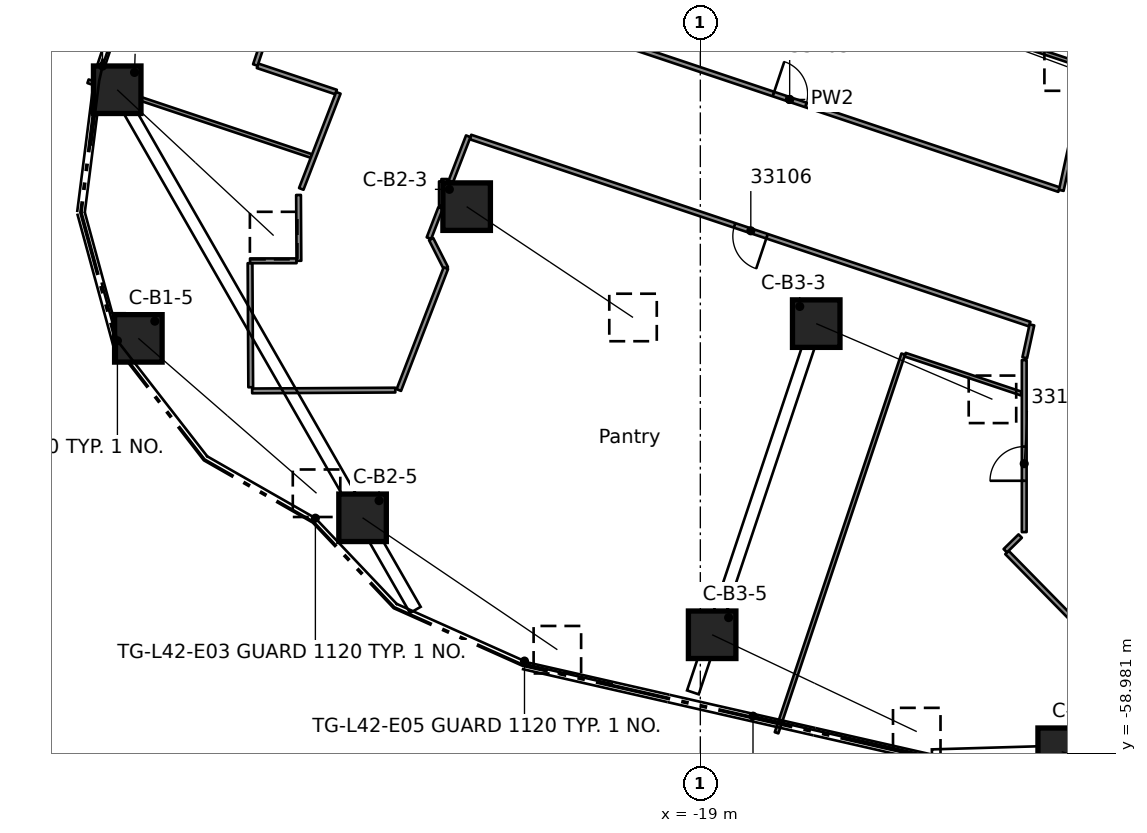
"""IFC4 building model, lengths in metres.
Left out: names, types, materials, properties, quantities, classifications, styles, units other than length and angle.
Written with IfcOpenShell. Run it as: python <this file> out.ifc"""

import sys

from ifc_helpers import new_model, si_unit, direction, frame, frame_2d, origin, origin_2d, place, context, subcontext, project, spatial, rectangle, extrude, element, fill, save


model = new_model("IFC4")
c1 = context("Model", 3, precision=1e-05, world=origin(), true_north=direction((0.0, 1.0)))
c2 = subcontext(c1, "Body", "Model", "MODEL_VIEW")
j1 = project(units=[si_unit("LENGTHUNIT", "METRE"), si_unit("PLANEANGLEUNIT", "RADIAN")], contexts=[c1])
p1 = place(None, origin())
s1 = spatial("IfcSite", under=j1, at=p1, CompositionType="ELEMENT")
p2 = place(p1, origin())
s2 = spatial("IfcBuilding", under=s1, at=p2, CompositionType="ELEMENT")
p3 = place(p2, frame((0.0, 0.0, 163.1)))
s3 = spatial("IfcBuildingStorey", under=s2, at=p3, CompositionType="ELEMENT", Elevation=163.1)
p4 = place(p3, frame((-34.344, -41.515, 0.556), z_axis=(0.650749520323, -0.606668854079, 0.456593871279), x_axis=(0.681899220361, 0.731446138326, 0.0)))
e1 = element("IfcColumn", 1, at=p4, inside=s3, PredefinedType="COLUMN", context=c2, shape_type="SweptSolid", body=[
    extrude(rectangle(XDim=1.25, YDim=1.25, at=origin_2d()), origin(), (0.0, 0.0, 1.0), 6.325),
])
p5 = place(p3, frame((-33.788, -48.056, 0.567), z_axis=(0.685344408242, -0.595777894409, 0.418750215075), x_axis=(0.656069747927, 0.75470026226, 0.0)))
e2 = element("IfcColumn", 2, at=p5, inside=s3, PredefinedType="COLUMN", context=c2, shape_type="SweptSolid", body=[
    extrude(rectangle(XDim=1.25, YDim=1.25, at=origin_2d()), origin(), (0.0, 0.0, 1.0), 6.842),
])
p6 = place(p3, frame((-25.149, -44.591, 0.547), z_axis=(0.728513829008, -0.485242537011, 0.483536225343), x_axis=(0.554357406679, 0.832278718735, 0.0)))
e3 = element("IfcColumn", 3, at=p6, inside=s3, PredefinedType="COLUMN", context=c2, shape_type="SweptSolid", body=[
    extrude(rectangle(XDim=1.25, YDim=1.25, at=origin_2d()), origin(), (0.0, 0.0, 1.0), 6.009),
])
p7 = place(p3, frame((-27.888, -52.778, 0.567), z_axis=(0.751434378717, -0.508817992104, 0.420060264003), x_axis=(0.56068332345, 0.82803031998, 0.0)))
e4 = element("IfcColumn", 4, at=p7, inside=s3, PredefinedType="COLUMN", context=c2, shape_type="SweptSolid", body=[
    extrude(rectangle(XDim=1.25, YDim=1.25, at=origin_2d()), origin(), (0.0, 0.0, 1.0), 6.822),
])
p8 = place(p3, frame((-13.21, -39.482, 0.507), z_axis=(0.761221861234, -0.281091530402, 0.58440467958), x_axis=(0.346401191704, 0.938086464238, 0.0)))
e5 = element("IfcColumn", 5, at=p8, inside=s3, PredefinedType="COLUMN", context=c2, shape_type="SweptSolid", body=[
    extrude(rectangle(XDim=1.25, YDim=1.25, at=origin_2d()), origin(), (0.0, 0.0, 1.0), 5.109),
])
p9 = place(p3, frame((-15.95, -47.669, 0.541), z_axis=(0.795438712941, -0.34170402037, 0.500515350832), x_axis=(0.394701516002, 0.918809399857, 0.0)))
e6 = element("IfcColumn", 6, at=p9, inside=s3, PredefinedType="COLUMN", context=c2, shape_type="SweptSolid", body=[
    extrude(rectangle(XDim=1.25, YDim=1.25, at=origin_2d()), origin(), (0.0, 0.0, 1.0), 5.829),
])
p10 = place(p3, frame((-18.689, -55.856, 0.563), z_axis=(0.814063560894, -0.385271001, 0.434588051622), x_axis=(0.427779753308, 0.90388300275, 0.0)))
e7 = element("IfcColumn", 7, at=p10, inside=s3, PredefinedType="COLUMN", context=c2, shape_type="SweptSolid", body=[
    extrude(rectangle(XDim=1.25, YDim=1.25, at=origin_2d()), origin(), (0.0, 0.0, 1.0), 6.614),
])
p11 = place(p3, frame((-9.491, -58.934, 0.561), z_axis=(0.862996024395, -0.248319472025, 0.439971932845), x_axis=(0.276521475753, 0.961007738495, 0.0)))
e8 = element("IfcColumn", 8, at=p11, inside=s3, PredefinedType="COLUMN", context=c2, shape_type="SweptSolid", body=[
    extrude(rectangle(XDim=1.25, YDim=1.25, at=origin_2d()), origin(), (0.0, 0.0, 1.0), 6.54),
])
p12 = place(p3, frame((-30.849, -46.079, 0.0), z_axis=(0.0, 0.0, 1.0), x_axis=(0.005535108565, -0.999984681169, 0.0)))
e9 = element("IfcWall", 9, at=p12, inside=s3, PredefinedType="PARTITIONING", context=c2, shape_type="SweptSolid", body=[
    extrude(rectangle(XDim=3.264, YDim=0.125, at=frame_2d((1.632, 0.0))), origin(), (0.0, 0.0, 1.0), 3.56),
])
p13 = place(p3, frame((-10.932, -53.69, 0.0), z_axis=(0.0, 0.0, 1.0), x_axis=(0.700343889426, -0.713805601368, 0.0)))
e10 = element("IfcWall", 10, at=p13, inside=s3, PredefinedType="PARTITIONING", context=c2, shape_type="SweptSolid", body=[
    extrude(rectangle(XDim=7.291, YDim=0.125, at=frame_2d((3.645, 0.0))), origin(), (0.0, 0.0, 1.0), 3.56),
])
p14 = place(p3, frame((-26.084, -45.444, 0.0), z_axis=(0.0, 0.0, 1.0), x_axis=(0.452330198843, -0.891850543093, 0.0)))
e11 = element("IfcWall", 11, at=p14, inside=s3, PredefinedType="PARTITIONING", context=c2, shape_type="SweptSolid", body=[
    extrude(rectangle(XDim=0.858, YDim=0.125, at=frame_2d((0.429, 0.0))), origin(), (0.0, 0.0, 1.0), 3.56),
])
p15 = place(p3, frame((-35.112, -41.292, 0.0), z_axis=(0.0, 0.0, 1.0), x_axis=(0.948312413327, -0.317338252863, 0.0)))
e12 = element("IfcWall", 12, at=p15, inside=s3, PredefinedType="PARTITIONING", context=c2, shape_type="SweptSolid", body=[
    extrude(rectangle(XDim=6.198, YDim=0.1, at=frame_2d((3.099, 0.0))), origin(), (0.0, 0.0, 1.0), 3.56),
])
p16 = place(p3, frame((-13.612, -48.486, 0.0), z_axis=(0.0, 0.0, 1.0), x_axis=(0.948319156471, -0.317318101391, 0.0)))
e13 = element("IfcWall", 13, at=p16, inside=s3, PredefinedType="PARTITIONING", context=c2, shape_type="SweptSolid", body=[
    extrude(rectangle(XDim=3.224, YDim=0.1, at=frame_2d((1.612, 0.0))), origin(), (0.0, 0.0, 1.0), 3.56),
])
p17 = place(p3, frame((-30.651, -40.885, 0.0), z_axis=(0.0, 0.0, 1.0), x_axis=(0.948414092201, -0.317034240601, 0.0)))
e14 = element("IfcWall", 14, at=p17, inside=s3, PredefinedType="PARTITIONING", context=c2, shape_type="SweptSolid", body=[
    extrude(rectangle(XDim=2.179, YDim=0.125, at=frame_2d((1.09, 0.0))), origin(), (0.0, 0.0, 1.0), 3.56),
])
p18 = place(p3, frame((-10.334, -47.682, 0.0), z_axis=(0.0, 0.0, 1.0), x_axis=(-0.948331823852, 0.317280241852, 0.0)))
e15 = element("IfcWall", 15, at=p18, inside=s3, PredefinedType="PARTITIONING", context=c2, shape_type="SweptSolid", body=[
    extrude(rectangle(XDim=15.516, YDim=0.125, at=frame_2d((7.758, 0.0))), origin(), (0.0, 0.0, 1.0), 3.56),
])
p19 = place(p18, frame((7.288, 0.0, 0.0)))
e16 = element("IfcOpeningElement", 16, at=p19, cuts=e15, PredefinedType="OPENING", context=c2, shape_type="SweptSolid", body=[
    extrude(rectangle(XDim=0.9, YDim=2.1, at=frame_2d((0.45, 1.05))), frame((0.0, 0.073, 0.0), z_axis=(0.0, -1.0, 0.0), x_axis=(1.0, 0.0, 0.0)), (0.0, 0.0, 1.0), 0.145),
])
p20 = place(p3, frame((-23.75, -39.396, 0.0), z_axis=(0.0, 0.0, 1.0), x_axis=(0.948333527716, -0.317275149057, 0.0)))
e17 = element("IfcWall", 17, at=p20, inside=s3, PredefinedType="PARTITIONING", context=c2, shape_type="SweptSolid", body=[
    extrude(rectangle(XDim=14.962, YDim=0.125, at=frame_2d((7.481, 0.0))), origin(), (0.0, 0.0, 1.0), 3.56),
])
p21 = place(p20, frame((7.038, 0.0, 0.0)))
e18 = element("IfcOpeningElement", 18, at=p21, cuts=e17, PredefinedType="OPENING", context=c2, shape_type="SweptSolid", body=[
    extrude(rectangle(XDim=0.9, YDim=2.1, at=frame_2d((0.45, 1.05))), frame((0.0, 0.073, 0.0), z_axis=(0.0, -1.0, 0.0), x_axis=(1.0, 0.0, 0.0)), (0.0, 0.0, 1.0), 0.145),
])
p22 = place(p3, frame((-22.995, -36.173, 0.0), z_axis=(0.0, 0.0, 1.0), x_axis=(0.948340615741, -0.317253962207, 0.0)))
e19 = element("IfcWall", 19, at=p22, inside=s3, PredefinedType="PARTITIONING", context=c2, shape_type="SweptSolid", body=[
    extrude(rectangle(XDim=15.057, YDim=0.1, at=frame_2d((7.528, 0.0))), origin(), (0.0, 0.0, 1.0), 3.56),
])
p23 = place(p3, frame((-30.849, -46.016, 0.0), z_axis=(0.0, 0.0, 1.0), x_axis=(1.0, 0.0, 0.0)))
e20 = element("IfcWall", 20, at=p23, inside=s3, PredefinedType="PARTITIONING", context=c2, shape_type="SweptSolid", body=[
    extrude(rectangle(XDim=1.224, YDim=0.125, at=frame_2d((0.612, 0.0))), origin(), (0.0, 0.0, 1.0), 3.56),
])
p24 = place(p3, frame((-25.813, -43.927, 0.0), z_axis=(0.0, 0.0, 1.0), x_axis=(1.0, 0.0, 0.0)))
e21 = element("IfcWall", 21, at=p24, inside=s3, PredefinedType="PARTITIONING", context=c2, shape_type="SweptSolid", body=[
    extrude(rectangle(XDim=0.157, YDim=0.125, at=frame_2d((0.079, 0.0))), origin(), (0.0, 0.0, 1.0), 3.56),
])
p25 = place(p3, frame((-30.793, -49.439, 0.0), z_axis=(0.0, 0.0, 1.0), x_axis=(0.999984458017, 0.005575278016, 0.0)))
e22 = element("IfcWall", 22, at=p25, inside=s3, PredefinedType="PARTITIONING", context=c2, shape_type="SweptSolid", body=[
    extrude(rectangle(XDim=3.766, YDim=0.125, at=frame_2d((1.883, 0.0))), origin(), (0.0, 0.0, 1.0), 3.56),
])
p26 = place(p3, frame((-10.976, -53.645, 0.0), z_axis=(0.0, 0.0, 1.0), x_axis=(0.713503545627, 0.700651618408, 0.0)))
e23 = element("IfcWall", 23, at=p26, inside=s3, PredefinedType="PARTITIONING", context=c2, shape_type="SweptSolid", body=[
    extrude(rectangle(XDim=0.551, YDim=0.125, at=frame_2d((0.275, 0.0))), origin(), (0.0, 0.0, 1.0), 3.56),
])
p27 = place(p3, frame((-26.934, -49.417, 0.0), z_axis=(0.0, 0.0, 1.0), x_axis=(0.360039818121, 0.932936937508, 0.0)))
e24 = element("IfcWall", 24, at=p27, inside=s3, PredefinedType="PARTITIONING", context=c2, shape_type="SweptSolid", body=[
    extrude(rectangle(XDim=3.439, YDim=0.125, at=frame_2d((1.719, 0.0))), origin(), (0.0, 0.0, 1.0), 3.56),
])
p28 = place(p3, frame((-26.142, -45.421, 0.0), z_axis=(0.0, 0.0, 1.0), x_axis=(0.360172075404, 0.932885885894, 0.0)))
e25 = element("IfcWall", 25, at=p28, inside=s3, PredefinedType="PARTITIONING", context=c2, shape_type="SweptSolid", body=[
    extrude(rectangle(XDim=0.85, YDim=0.125, at=frame_2d((0.425, 0.0))), origin(), (0.0, 0.0, 1.0), 3.56),
])
p29 = place(p3, frame((-25.565, -43.926, 0.0), z_axis=(0.0, 0.0, 1.0), x_axis=(0.359981832882, 0.932959313151, 0.0)))
e26 = element("IfcWall", 26, at=p29, inside=s3, PredefinedType="PARTITIONING", context=c2, shape_type="SweptSolid", body=[
    extrude(rectangle(XDim=1.272, YDim=0.125, at=frame_2d((0.636, 0.0))), origin(), (0.0, 0.0, 1.0), 3.56),
])
p30 = place(p3, frame((-28.525, -41.596, 0.0), z_axis=(0.0, 0.0, 1.0), x_axis=(-0.360180137792, -0.932882773096, 0.0)))
e27 = element("IfcWall", 27, at=p30, inside=s3, PredefinedType="PARTITIONING", context=c2, shape_type="SweptSolid", body=[
    extrude(rectangle(XDim=2.71, YDim=0.125, at=frame_2d((1.355, 0.0))), origin(), (0.0, 0.0, 1.0), 3.56),
])
p31 = place(p3, frame((-16.994, -58.435, 0.0), z_axis=(0.0, 0.0, 1.0), x_axis=(0.317308025423, 0.948322527942, 0.0)))
e28 = element("IfcWall", 28, at=p31, inside=s3, PredefinedType="PARTITIONING", context=c2, shape_type="SweptSolid", body=[
    extrude(rectangle(XDim=10.507, YDim=0.1, at=frame_2d((5.253, 0.0))), origin(), (0.0, 0.0, 1.0), 3.56),
])
p32 = place(p3, frame((-30.71, -40.864, 0.0), z_axis=(0.0, 0.0, 1.0), x_axis=(0.317183836314, 0.948364072485, 0.0)))
e29 = element("IfcWall", 29, at=p32, inside=s3, PredefinedType="PARTITIONING", context=c2, shape_type="SweptSolid", body=[
    extrude(rectangle(XDim=3.6, YDim=0.125, at=frame_2d((1.8, 0.0))), origin(), (0.0, 0.0, 1.0), 3.56),
])
p33 = place(p32, frame((1.35, 0.0, 0.0)))
e30 = element("IfcOpeningElement", 30, at=p33, cuts=e29, PredefinedType="OPENING", context=c2, shape_type="SweptSolid", body=[
    extrude(rectangle(XDim=1.0, YDim=2.1, at=frame_2d((0.5, 1.05))), frame((0.0, 0.073, 0.0), z_axis=(0.0, -1.0, 0.0), x_axis=(1.0, 0.0, 0.0)), (0.0, 0.0, 1.0), 0.145),
])
p34 = place(p3, frame((-9.502, -44.163, 0.0), z_axis=(0.0, 0.0, 1.0), x_axis=(0.213189538539, 0.977010860051, 0.0)))
e31 = element("IfcWall", 31, at=p34, inside=s3, PredefinedType="PARTITIONING", context=c2, shape_type="SweptSolid", body=[
    extrude(rectangle(XDim=2.641, YDim=0.125, at=frame_2d((1.32, 0.0))), origin(), (0.0, 0.0, 1.0), 3.56),
])
p35 = place(p3, frame((-10.463, -48.567, 0.0), z_axis=(0.0, 0.0, 1.0), x_axis=(0.212372391341, 0.977188808469, 0.0)))
e32 = element("IfcWall", 32, at=p35, inside=s3, PredefinedType="PARTITIONING", context=c2, shape_type="SweptSolid", body=[
    extrude(rectangle(XDim=0.885, YDim=0.125, at=frame_2d((0.443, 0.0))), origin(), (0.0, 0.0, 1.0), 3.56),
])
p36 = place(p3, frame((-10.477, -53.154, 0.0), z_axis=(0.0, 0.0, 1.0), x_axis=(0.0, 1.0, 0.0)))
e33 = element("IfcWall", 33, at=p36, inside=s3, PredefinedType="PARTITIONING", context=c2, shape_type="SweptSolid", body=[
    extrude(rectangle(XDim=4.525, YDim=0.125, at=frame_2d((2.263, 0.0))), origin(), (0.0, 0.0, 1.0), 3.56),
])
p37 = place(p36, frame((1.35, 0.0, 0.0)))
e34 = element("IfcOpeningElement", 34, at=p37, cuts=e33, PredefinedType="OPENING", context=c2, shape_type="SweptSolid", body=[
    extrude(rectangle(XDim=0.9, YDim=2.1, at=frame_2d((0.45, 1.05))), frame((0.0, 0.073, 0.0), z_axis=(0.0, -1.0, 0.0), x_axis=(1.0, 0.0, 0.0)), (0.0, 0.0, 1.0), 0.145),
])
p38 = place(p3, frame((-25.813, -44.569, 0.0), z_axis=(0.0, 0.0, 1.0), x_axis=(0.0, 1.0, 0.0)))
e35 = element("IfcWall", 35, at=p38, inside=s3, PredefinedType="PARTITIONING", context=c2, shape_type="SweptSolid", body=[
    extrude(rectangle(XDim=0.642, YDim=0.125, at=frame_2d((0.321, 0.0))), origin(), (0.0, 0.0, 1.0), 3.56),
])
p39 = place(p3, frame((-29.563, -46.016, 0.0), z_axis=(0.0, 0.0, 1.0), x_axis=(-0.005778620923, 0.999983303631, 0.0)))
e36 = element("IfcWall", 36, at=p39, inside=s3, PredefinedType="PARTITIONING", context=c2, shape_type="SweptSolid", body=[
    extrude(rectangle(XDim=1.732, YDim=0.125, at=frame_2d((0.866, 0.0))), origin(), (0.0, 0.0, 1.0), 3.56),
])
p40 = place(p21, origin())
e37 = element("IfcDoor", 37, at=p40, inside=s3, OperationType="SINGLE_SWING_RIGHT", PredefinedType="DOOR", context=c2, shape_type="SweptSolid", body=[
    extrude(rectangle(XDim=0.9, YDim=2.1, at=frame_2d((0.45, 1.05))), frame((0.0, 0.025, 0.0), z_axis=(0.0, -1.0, 0.0), x_axis=(1.0, 0.0, 0.0)), (0.0, 0.0, 1.0), 0.05),
])
fill(e18, e37)
p41 = place(p19, origin())
e38 = element("IfcDoor", 38, at=p41, inside=s3, OperationType="SINGLE_SWING_LEFT", PredefinedType="DOOR", context=c2, shape_type="SweptSolid", body=[
    extrude(rectangle(XDim=0.9, YDim=2.1, at=frame_2d((0.45, 1.05))), frame((0.0, 0.025, 0.0), z_axis=(0.0, -1.0, 0.0), x_axis=(1.0, 0.0, 0.0)), (0.0, 0.0, 1.0), 0.05),
])
fill(e16, e38)
p42 = place(p37, origin())
e39 = element("IfcDoor", 39, at=p42, inside=s3, OperationType="SINGLE_SWING_LEFT", PredefinedType="DOOR", context=c2, shape_type="SweptSolid", body=[
    extrude(rectangle(XDim=0.9, YDim=2.1, at=frame_2d((0.45, 1.05))), frame((0.0, 0.025, 0.0), z_axis=(0.0, -1.0, 0.0), x_axis=(1.0, 0.0, 0.0)), (0.0, 0.0, 1.0), 0.05),
])
fill(e34, e39)
save(model, sys.argv[1])
